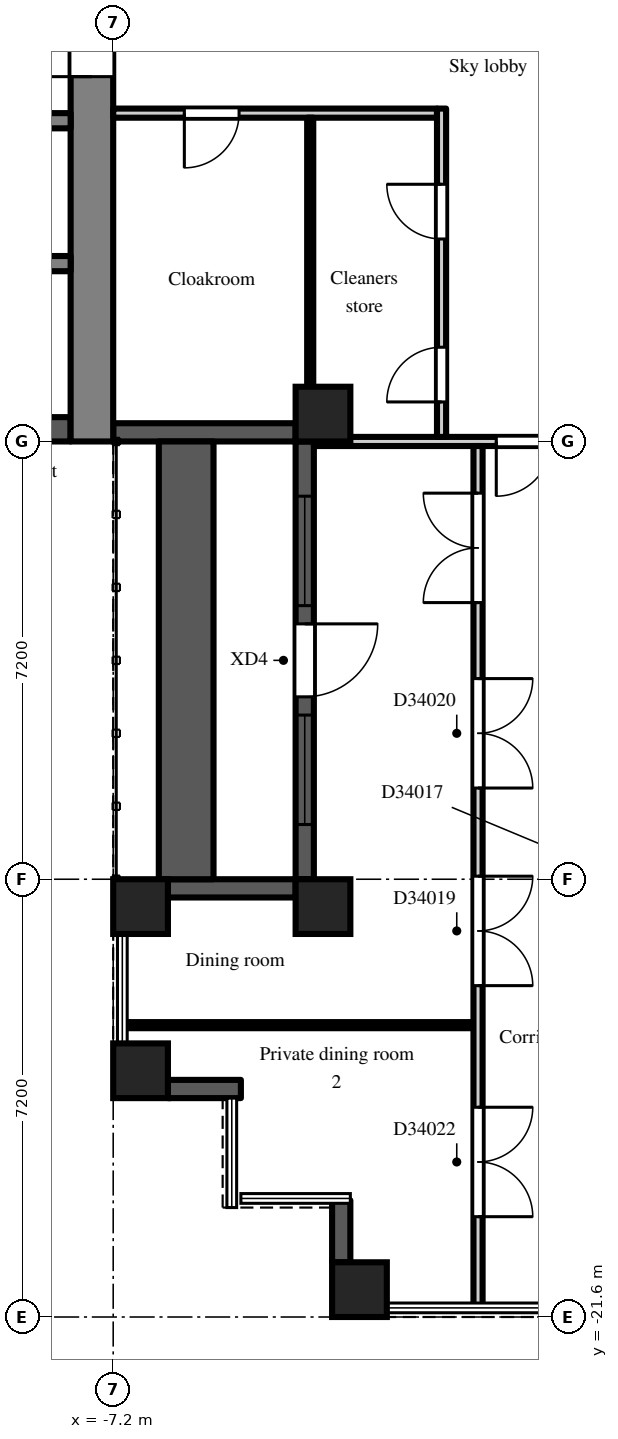
"""IFC4 building model, lengths in metres.
Left out: names, types, materials, properties, quantities, classifications, styles, units other than length and angle.
Written with IfcOpenShell. Run it as: python <this file> out.ifc"""

import sys

from ifc_helpers import new_model, si_unit, direction, frame, frame_2d, origin, origin_2d, place, context, subcontext, project, spatial, rectangle, extrude, element, fill, save


model = new_model("IFC4")
c1 = context("Model", 3, precision=1e-05, world=origin(), true_north=direction((0.0, 1.0)))
c2 = subcontext(c1, "Body", "Model", "MODEL_VIEW")
j1 = project(units=[si_unit("LENGTHUNIT", "METRE"), si_unit("PLANEANGLEUNIT", "RADIAN")], contexts=[c1])
p1 = place(None, origin())
s1 = spatial("IfcSite", under=j1, at=p1, CompositionType="ELEMENT")
p2 = place(p1, origin())
s2 = spatial("IfcBuilding", under=s1, at=p2, CompositionType="ELEMENT")
p3 = place(p2, frame((0.0, 0.0, 237.9)))
s3 = spatial("IfcBuildingStorey", under=s2, at=p3, CompositionType="ELEMENT", Elevation=237.9)
for number, where, z_axis, x_axis in (
    (1, (-6.75, -17.55, 0.0), (0.0, 0.0, 1.0), (1.0, 0.0, 0.0)),
    (2, (-6.75, -14.85, 0.0), (0.0, 0.0, 1.0), (1.0, 0.0, 0.0)),
    (3, (-3.75, -14.85, 0.0), (0.0, 0.0, 1.0), (1.0, 0.0, 0.0)),
    (4, (-3.75, -6.75, 0.0), (0.0, 0.0, 1.0), (1.0, 0.0, 0.0)),
    (5, (-3.15, -21.15, 0.0), (0.0, 0.0, 1.0), (1.0, 0.0, 0.0)),
):
    element("IfcColumn", number, at=place(p3, frame(where, z_axis=z_axis, x_axis=x_axis)), inside=s3, PredefinedType="COLUMN", context=c2, shape_type="SweptSolid", body=[
        extrude(rectangle(XDim=0.9, YDim=0.9, at=origin_2d()), origin(), (0.0, 0.0, 1.0), 4.2),
    ])
p4 = place(p3, frame((-7.2, -7.05, 0.0), z_axis=(0.0, 0.0, 1.0), x_axis=(1.0, 0.0, 0.0)))
e6 = element("IfcWall", 6, at=p4, inside=s3, PredefinedType="SOLIDWALL", context=c2, shape_type="SweptSolid", body=[
    extrude(rectangle(XDim=3.0, YDim=0.3, at=frame_2d((1.5, 0.0))), origin(), (0.0, 0.0, 1.0), 3.75),
])
p5 = place(p3, frame((-4.05, -7.2, 0.0), z_axis=(0.0, 0.0, 1.0), x_axis=(0.0, -1.0, 0.0)))
e7 = element("IfcWall", 7, at=p5, inside=s3, PredefinedType="SOLIDWALL", context=c2, shape_type="SweptSolid", body=[
    extrude(rectangle(XDim=7.2, YDim=0.3, at=frame_2d((3.6, 0.0))), origin(), (0.0, 0.0, 1.0), 3.75),
])
p6 = place(p5, frame((3.0, 0.0, 0.0)))
e8 = element("IfcOpeningElement", 8, at=p6, cuts=e7, PredefinedType="OPENING", context=c2, shape_type="SweptSolid", body=[
    extrude(rectangle(XDim=1.2, YDim=2.05, at=frame_2d((0.6, 1.025))), frame((0.0, 0.16, 0.0), z_axis=(0.0, -1.0, 0.0), x_axis=(1.0, 0.0, 0.0)), (0.0, 0.0, 1.0), 0.32),
])
p7 = place(p5, frame((0.9, 0.0, 0.2)))
e9 = element("IfcOpeningElement", 9, at=p7, cuts=e7, PredefinedType="OPENING", context=c2, shape_type="SweptSolid", body=[
    extrude(rectangle(XDim=1.8, YDim=1.85, at=frame_2d((0.9, 0.925))), frame((0.0, 0.16, 0.0), z_axis=(0.0, -1.0, 0.0), x_axis=(1.0, 0.0, 0.0)), (0.0, 0.0, 1.0), 0.32),
])
p8 = place(p5, frame((4.5, 0.0, 0.2)))
e10 = element("IfcOpeningElement", 10, at=p8, cuts=e7, PredefinedType="OPENING", context=c2, shape_type="SweptSolid", body=[
    extrude(rectangle(XDim=1.8, YDim=1.85, at=frame_2d((0.9, 0.925))), frame((0.0, 0.16, 0.0), z_axis=(0.0, -1.0, 0.0), x_axis=(1.0, 0.0, 0.0)), (0.0, 0.0, 1.0), 0.32),
])
p9 = place(p3, frame((-4.2, -14.55, 0.0), z_axis=(0.0, 0.0, 1.0), x_axis=(-1.0, 0.0, 0.0)))
e11 = element("IfcWall", 11, at=p9, inside=s3, PredefinedType="SOLIDWALL", context=c2, shape_type="SweptSolid", body=[
    extrude(rectangle(XDim=2.1, YDim=0.3, at=frame_2d((1.05, 0.0))), origin(), (0.0, 0.0, 1.0), 3.75),
])
p10 = place(p3, frame((-6.3, -17.85, 0.0), z_axis=(0.0, 0.0, 1.0), x_axis=(1.0, 0.0, 0.0)))
e12 = element("IfcWall", 12, at=p10, inside=s3, PredefinedType="SOLIDWALL", context=c2, shape_type="SweptSolid", body=[
    extrude(rectangle(XDim=1.2, YDim=0.3, at=frame_2d((0.6, 0.0))), origin(), (0.0, 0.0, 1.0), 3.75),
])
p11 = place(p3, frame((-3.45, -19.68, 0.0), z_axis=(0.0, 0.0, 1.0), x_axis=(0.0, -1.0, 0.0)))
e13 = element("IfcWall", 13, at=p11, inside=s3, PredefinedType="SOLIDWALL", context=c2, shape_type="SweptSolid", body=[
    extrude(rectangle(XDim=1.02, YDim=0.3, at=frame_2d((0.51, 0.0))), origin(), (0.0, 0.0, 1.0), 3.75),
])
p12 = place(p3, frame((-6.0, -14.4, 0.0), z_axis=(0.0, 0.0, 1.0), x_axis=(0.0, 1.0, 0.0)))
e14 = element("IfcWall", 14, at=p12, inside=s3, PredefinedType="PARAPET", context=c2, shape_type="SweptSolid", body=[
    extrude(rectangle(XDim=7.2, YDim=0.9, at=frame_2d((3.6, 0.0))), origin(), (0.0, 0.0, 1.0), 0.8),
])
p13 = place(p3, frame((-7.55, -7.2, 0.0), z_axis=(0.0, 0.0, 1.0), x_axis=(0.0, 1.0, 0.0)))
e15 = element("IfcWall", 15, at=p13, inside=s3, PredefinedType="SHEAR", context=c2, shape_type="SweptSolid", body=[
    extrude(rectangle(XDim=14.4, YDim=0.7, at=frame_2d((7.2, 0.0))), origin(), (0.0, 0.0, 1.0), 3.75),
])
p14 = place(p13, frame((6.0, 0.0, 0.0)))
e16 = element("IfcOpeningElement", 16, at=p14, cuts=e15, PredefinedType="OPENING", context=c2, shape_type="SweptSolid", body=[
    extrude(rectangle(XDim=2.4, YDim=2.2, at=frame_2d((1.2, 1.1))), frame((0.0, 0.36, 0.0), z_axis=(0.0, -1.0, 0.0), x_axis=(1.0, 0.0, 0.0)), (0.0, 0.0, 1.0), 0.72),
])
p15 = place(p3, frame((-7.9, -7.0, 0.0), z_axis=(0.0, 0.0, 1.0), x_axis=(-1.0, 0.0, 0.0)))
e17 = element("IfcWall", 17, at=p15, inside=s3, PredefinedType="SHEAR", context=c2, shape_type="SweptSolid", body=[
    extrude(rectangle(XDim=12.95, YDim=0.4, at=frame_2d((6.475, 0.0))), origin(), (0.0, 0.0, 1.0), 3.75),
])
p16 = place(p3, frame((-7.9, -1.925, 0.0), z_axis=(0.0, 0.0, 1.0), x_axis=(-1.0, 0.0, 0.0)))
e18 = element("IfcWall", 18, at=p16, inside=s3, PredefinedType="SHEAR", context=c2, shape_type="SweptSolid", body=[
    extrude(rectangle(XDim=12.95, YDim=0.25, at=frame_2d((6.475, 0.0))), origin(), (0.0, 0.0, 1.0), 3.75),
])
p17 = place(p16, frame((0.525, 0.0, 0.0)))
e19 = element("IfcOpeningElement", 19, at=p17, cuts=e18, PredefinedType="OPENING", context=c2, shape_type="SweptSolid", body=[
    extrude(rectangle(XDim=0.9, YDim=2.1, at=frame_2d((0.45, 1.05))), frame((0.0, 0.135, 0.0), z_axis=(0.0, -1.0, 0.0), x_axis=(1.0, 0.0, 0.0)), (0.0, 0.0, 1.0), 0.27),
])
p18 = place(p16, frame((2.575, 0.0, 0.0)))
e20 = element("IfcOpeningElement", 20, at=p18, cuts=e18, PredefinedType="OPENING", context=c2, shape_type="SweptSolid", body=[
    extrude(rectangle(XDim=1.2, YDim=2.1, at=frame_2d((0.6, 1.05))), frame((0.0, 0.135, 0.0), z_axis=(0.0, -1.0, 0.0), x_axis=(1.0, 0.0, 0.0)), (0.0, 0.0, 1.0), 0.27),
])
p19 = place(p16, frame((6.025, 0.0, 0.0)))
e21 = element("IfcOpeningElement", 21, at=p19, cuts=e18, PredefinedType="OPENING", context=c2, shape_type="SweptSolid", body=[
    extrude(rectangle(XDim=0.9, YDim=2.1, at=frame_2d((0.45, 1.05))), frame((0.0, 0.135, 0.0), z_axis=(0.0, -1.0, 0.0), x_axis=(1.0, 0.0, 0.0)), (0.0, 0.0, 1.0), 0.27),
])
p20 = place(p16, frame((10.425, 0.0, 0.0)))
e22 = element("IfcOpeningElement", 22, at=p20, cuts=e18, PredefinedType="OPENING", context=c2, shape_type="SweptSolid", body=[
    extrude(rectangle(XDim=0.9, YDim=2.1, at=frame_2d((0.45, 1.05))), frame((0.0, 0.135, 0.0), z_axis=(0.0, -1.0, 0.0), x_axis=(1.0, 0.0, 0.0)), (0.0, 0.0, 1.0), 0.27),
])
p21 = place(p3, frame((-7.9, -4.275, 0.0), z_axis=(0.0, 0.0, 1.0), x_axis=(-1.0, 0.0, 0.0)))
e23 = element("IfcWall", 23, at=p21, inside=s3, PredefinedType="SHEAR", context=c2, shape_type="SweptSolid", body=[
    extrude(rectangle(XDim=1.95, YDim=0.25, at=frame_2d((0.975, 0.0))), origin(), (0.0, 0.0, 1.0), 3.75),
])
p22 = place(p3, frame((-7.2, -1.8, 0.0), z_axis=(0.0, 0.0, 1.0), x_axis=(1.0, 0.0, 0.0)))
e24 = element("IfcWall", 24, at=p22, inside=s3, PredefinedType="PARTITIONING", context=c2, shape_type="SweptSolid", body=[
    extrude(rectangle(XDim=5.325, YDim=0.15, at=frame_2d((2.663, 0.0))), origin(), (0.0, 0.0, 1.0), 3.75),
])
p23 = place(p22, frame((1.17, 0.0, 0.0)))
e25 = element("IfcOpeningElement", 25, at=p23, cuts=e24, PredefinedType="OPENING", context=c2, shape_type="SweptSolid", body=[
    extrude(rectangle(XDim=0.9, YDim=2.1, at=frame_2d((0.45, 1.05))), frame((0.0, 0.085, 0.0), z_axis=(0.0, -1.0, 0.0), x_axis=(1.0, 0.0, 0.0)), (0.0, 0.0, 1.0), 0.17),
])
p24 = place(p3, frame((-7.02, -16.8, 0.0), z_axis=(0.0, 0.0, 1.0), x_axis=(1.0, 0.0, 0.0)))
e26 = element("IfcWall", 26, at=p24, inside=s3, PredefinedType="PARTITIONING", context=c2, shape_type="SweptSolid", body=[
    extrude(rectangle(XDim=5.745, YDim=0.1, at=frame_2d((2.873, 0.0))), origin(), (0.0, 0.0, 1.0), 3.75),
])
p25 = place(p3, frame((-3.96, -6.9, 0.0), z_axis=(0.0, 0.0, 1.0), x_axis=(0.0, 1.0, 0.0)))
e27 = element("IfcWall", 27, at=p25, inside=s3, PredefinedType="PARTITIONING", context=c2, shape_type="SweptSolid", body=[
    extrude(rectangle(XDim=5.025, YDim=0.1, at=frame_2d((2.512, 0.0))), origin(), (0.0, 0.0, 1.0), 3.75),
])
p26 = place(p3, frame((-3.9, -7.2, 0.0), z_axis=(0.0, 0.0, 1.0), x_axis=(1.0, 0.0, 0.0)))
e28 = element("IfcWall", 28, at=p26, inside=s3, PredefinedType="PARTITIONING", context=c2, shape_type="SweptSolid", body=[
    extrude(rectangle(XDim=5.7, YDim=0.15, at=frame_2d((2.85, 0.0))), origin(), (0.0, 0.0, 1.0), 3.75),
])
p27 = place(p26, frame((3.0, 0.0, 0.0)))
e29 = element("IfcOpeningElement", 29, at=p27, cuts=e28, PredefinedType="OPENING", context=c2, shape_type="SweptSolid", body=[
    extrude(rectangle(XDim=1.8, YDim=2.1, at=frame_2d((0.9, 1.05))), frame((0.0, 0.085, 0.0), z_axis=(0.0, -1.0, 0.0), x_axis=(1.0, 0.0, 0.0)), (0.0, 0.0, 1.0), 0.17),
])
p28 = place(p3, frame((-1.8, -7.125, 0.0), z_axis=(0.0, 0.0, 1.0), x_axis=(0.0, 1.0, 0.0)))
e30 = element("IfcWall", 30, at=p28, inside=s3, PredefinedType="PARTITIONING", context=c2, shape_type="SweptSolid", body=[
    extrude(rectangle(XDim=5.4, YDim=0.15, at=frame_2d((2.7, 0.0))), origin(), (0.0, 0.0, 1.0), 3.75),
])
p29 = place(p28, frame((0.575, 0.0, 0.0)))
e31 = element("IfcOpeningElement", 31, at=p29, cuts=e30, PredefinedType="OPENING", context=c2, shape_type="SweptSolid", body=[
    extrude(rectangle(XDim=0.9, YDim=2.1, at=frame_2d((0.45, 1.05))), frame((0.0, 0.085, 0.0), z_axis=(0.0, -1.0, 0.0), x_axis=(1.0, 0.0, 0.0)), (0.0, 0.0, 1.0), 0.17),
])
p30 = place(p28, frame((3.255, 0.0, 0.0)))
e32 = element("IfcOpeningElement", 32, at=p30, cuts=e30, PredefinedType="OPENING", context=c2, shape_type="SweptSolid", body=[
    extrude(rectangle(XDim=0.9, YDim=2.1, at=frame_2d((0.45, 1.05))), frame((0.0, 0.085, 0.0), z_axis=(0.0, -1.0, 0.0), x_axis=(1.0, 0.0, 0.0)), (0.0, 0.0, 1.0), 0.17),
])
p31 = place(p3, frame((-1.2, -21.42, 0.0), z_axis=(0.0, 0.0, 1.0), x_axis=(0.0, 1.0, 0.0)))
e33 = element("IfcWall", 33, at=p31, inside=s3, PredefinedType="PARTITIONING", context=c2, shape_type="SweptSolid", body=[
    extrude(rectangle(XDim=14.145, YDim=0.15, at=frame_2d((7.073, 0.0))), origin(), (0.0, 0.0, 1.0), 3.75),
])
p32 = place(p31, frame((5.27, 0.0, 0.0)))
e34 = element("IfcOpeningElement", 34, at=p32, cuts=e33, PredefinedType="OPENING", context=c2, shape_type="SweptSolid", body=[
    extrude(rectangle(XDim=1.8, YDim=2.1, at=frame_2d((0.9, 1.05))), frame((0.0, 0.085, 0.0), z_axis=(0.0, -1.0, 0.0), x_axis=(1.0, 0.0, 0.0)), (0.0, 0.0, 1.0), 0.17),
])
p33 = place(p31, frame((8.52, 0.0, 0.0)))
e35 = element("IfcOpeningElement", 35, at=p33, cuts=e33, PredefinedType="OPENING", context=c2, shape_type="SweptSolid", body=[
    extrude(rectangle(XDim=1.8, YDim=2.1, at=frame_2d((0.9, 1.05))), frame((0.0, 0.085, 0.0), z_axis=(0.0, -1.0, 0.0), x_axis=(1.0, 0.0, 0.0)), (0.0, 0.0, 1.0), 0.17),
])
p34 = place(p31, frame((11.57, 0.0, 0.0)))
e36 = element("IfcOpeningElement", 36, at=p34, cuts=e33, PredefinedType="OPENING", context=c2, shape_type="SweptSolid", body=[
    extrude(rectangle(XDim=1.8, YDim=2.1, at=frame_2d((0.9, 1.05))), frame((0.0, 0.085, 0.0), z_axis=(0.0, -1.0, 0.0), x_axis=(1.0, 0.0, 0.0)), (0.0, 0.0, 1.0), 0.17),
])
p35 = place(p31, frame((1.47, 0.0, 0.0)))
e37 = element("IfcOpeningElement", 37, at=p35, cuts=e33, PredefinedType="OPENING", context=c2, shape_type="SweptSolid", body=[
    extrude(rectangle(XDim=1.8, YDim=2.1, at=frame_2d((0.9, 1.05))), frame((0.0, 0.085, 0.0), z_axis=(0.0, -1.0, 0.0), x_axis=(1.0, 0.0, 0.0)), (0.0, 0.0, 1.0), 0.17),
])
p36 = place(p6, origin())
e38 = element("IfcDoor", 38, at=p36, inside=s3, OperationType="SINGLE_SWING_LEFT", PredefinedType="DOOR", context=c2, shape_type="SweptSolid", body=[
    extrude(rectangle(XDim=1.2, YDim=2.05, at=frame_2d((0.6, 1.025))), frame((0.0, 0.025, 0.0), z_axis=(0.0, -1.0, 0.0), x_axis=(1.0, 0.0, 0.0)), (0.0, 0.0, 1.0), 0.05),
])
fill(e8, e38)
p37 = place(p7, origin())
e39 = element("IfcWindow", 39, at=p37, inside=s3, PartitioningType="SINGLE_PANEL", PredefinedType="WINDOW", context=c2, shape_type="SweptSolid", body=[
    extrude(rectangle(XDim=1.8, YDim=1.85, at=frame_2d((0.9, 0.925))), frame((0.0, 0.03, 0.0), z_axis=(0.0, -1.0, 0.0), x_axis=(1.0, 0.0, 0.0)), (0.0, 0.0, 1.0), 0.06),
])
fill(e9, e39)
p38 = place(p8, origin())
e40 = element("IfcWindow", 40, at=p38, inside=s3, PartitioningType="SINGLE_PANEL", PredefinedType="WINDOW", context=c2, shape_type="SweptSolid", body=[
    extrude(rectangle(XDim=1.8, YDim=1.85, at=frame_2d((0.9, 0.925))), frame((0.0, 0.03, 0.0), z_axis=(0.0, -1.0, 0.0), x_axis=(1.0, 0.0, 0.0)), (0.0, 0.0, 1.0), 0.06),
])
fill(e10, e40)
p39 = place(p14, origin())
e41 = element("IfcDoor", 41, at=p39, inside=s3, OperationType="DOUBLE_DOOR_DOUBLE_SWING", PredefinedType="DOOR", context=c2, shape_type="SweptSolid", body=[
    extrude(rectangle(XDim=2.4, YDim=2.2, at=frame_2d((1.2, 1.1))), frame((0.0, 0.025, 0.0), z_axis=(0.0, -1.0, 0.0), x_axis=(1.0, 0.0, 0.0)), (0.0, 0.0, 1.0), 0.05),
])
fill(e16, e41)
p40 = place(p29, origin())
e42 = element("IfcDoor", 42, at=p40, inside=s3, OperationType="SINGLE_SWING_LEFT", PredefinedType="DOOR", context=c2, shape_type="SweptSolid", body=[
    extrude(rectangle(XDim=0.9, YDim=2.1, at=frame_2d((0.45, 1.05))), frame((0.0, 0.025, 0.0), z_axis=(0.0, -1.0, 0.0), x_axis=(1.0, 0.0, 0.0)), (0.0, 0.0, 1.0), 0.05),
])
fill(e31, e42)
p41 = place(p30, origin())
e43 = element("IfcDoor", 43, at=p41, inside=s3, OperationType="SINGLE_SWING_RIGHT", PredefinedType="DOOR", context=c2, shape_type="SweptSolid", body=[
    extrude(rectangle(XDim=0.9, YDim=2.1, at=frame_2d((0.45, 1.05))), frame((0.0, 0.025, 0.0), z_axis=(0.0, -1.0, 0.0), x_axis=(1.0, 0.0, 0.0)), (0.0, 0.0, 1.0), 0.05),
])
fill(e32, e43)
p42 = place(p23, frame((0.9, 0.0, 0.0), z_axis=(0.0, 0.0, 1.0), x_axis=(-1.0, 0.0, 0.0)))
e44 = element("IfcDoor", 44, at=p42, inside=s3, OperationType="SINGLE_SWING_RIGHT", PredefinedType="DOOR", context=c2, shape_type="SweptSolid", body=[
    extrude(rectangle(XDim=0.9, YDim=2.1, at=frame_2d((0.45, 1.05))), frame((0.0, 0.025, 0.0), z_axis=(0.0, -1.0, 0.0), x_axis=(1.0, 0.0, 0.0)), (0.0, 0.0, 1.0), 0.05),
])
fill(e25, e44)
p43 = place(p27, frame((1.8, 0.0, 0.0), z_axis=(0.0, 0.0, 1.0), x_axis=(-1.0, 0.0, 0.0)))
e45 = element("IfcDoor", 45, at=p43, inside=s3, OperationType="DOUBLE_DOOR_DOUBLE_SWING", PredefinedType="DOOR", context=c2, shape_type="SweptSolid", body=[
    extrude(rectangle(XDim=1.8, YDim=2.1, at=frame_2d((0.9, 1.05))), frame((0.0, 0.025, 0.0), z_axis=(0.0, -1.0, 0.0), x_axis=(1.0, 0.0, 0.0)), (0.0, 0.0, 1.0), 0.05),
])
fill(e29, e45)
p44 = place(p32, frame((1.8, 0.0, 0.0), z_axis=(0.0, 0.0, 1.0), x_axis=(-1.0, 0.0, 0.0)))
e46 = element("IfcDoor", 46, at=p44, inside=s3, OperationType="DOUBLE_DOOR_DOUBLE_SWING", PredefinedType="DOOR", context=c2, shape_type="SweptSolid", body=[
    extrude(rectangle(XDim=1.8, YDim=2.1, at=frame_2d((0.9, 1.05))), frame((0.0, 0.025, 0.0), z_axis=(0.0, -1.0, 0.0), x_axis=(1.0, 0.0, 0.0)), (0.0, 0.0, 1.0), 0.05),
])
fill(e34, e46)
p45 = place(p33, frame((1.8, 0.0, 0.0), z_axis=(0.0, 0.0, 1.0), x_axis=(-1.0, 0.0, 0.0)))
e47 = element("IfcDoor", 47, at=p45, inside=s3, OperationType="DOUBLE_DOOR_DOUBLE_SWING", PredefinedType="DOOR", context=c2, shape_type="SweptSolid", body=[
    extrude(rectangle(XDim=1.8, YDim=2.1, at=frame_2d((0.9, 1.05))), frame((0.0, 0.025, 0.0), z_axis=(0.0, -1.0, 0.0), x_axis=(1.0, 0.0, 0.0)), (0.0, 0.0, 1.0), 0.05),
])
fill(e35, e47)
p46 = place(p34, origin())
e48 = element("IfcDoor", 48, at=p46, inside=s3, OperationType="DOUBLE_DOOR_DOUBLE_SWING", PredefinedType="DOOR", context=c2, shape_type="SweptSolid", body=[
    extrude(rectangle(XDim=1.8, YDim=2.1, at=frame_2d((0.9, 1.05))), frame((0.0, 0.025, 0.0), z_axis=(0.0, -1.0, 0.0), x_axis=(1.0, 0.0, 0.0)), (0.0, 0.0, 1.0), 0.05),
])
fill(e36, e48)
p47 = place(p35, frame((1.8, 0.0, 0.0), z_axis=(0.0, 0.0, 1.0), x_axis=(-1.0, 0.0, 0.0)))
e49 = element("IfcDoor", 49, at=p47, inside=s3, OperationType="DOUBLE_DOOR_DOUBLE_SWING", PredefinedType="DOOR", context=c2, shape_type="SweptSolid", body=[
    extrude(rectangle(XDim=1.8, YDim=2.1, at=frame_2d((0.9, 1.05))), frame((0.0, 0.025, 0.0), z_axis=(0.0, -1.0, 0.0), x_axis=(1.0, 0.0, 0.0)), (0.0, 0.0, 1.0), 0.05),
])
fill(e37, e49)
save(model, sys.argv[1])
